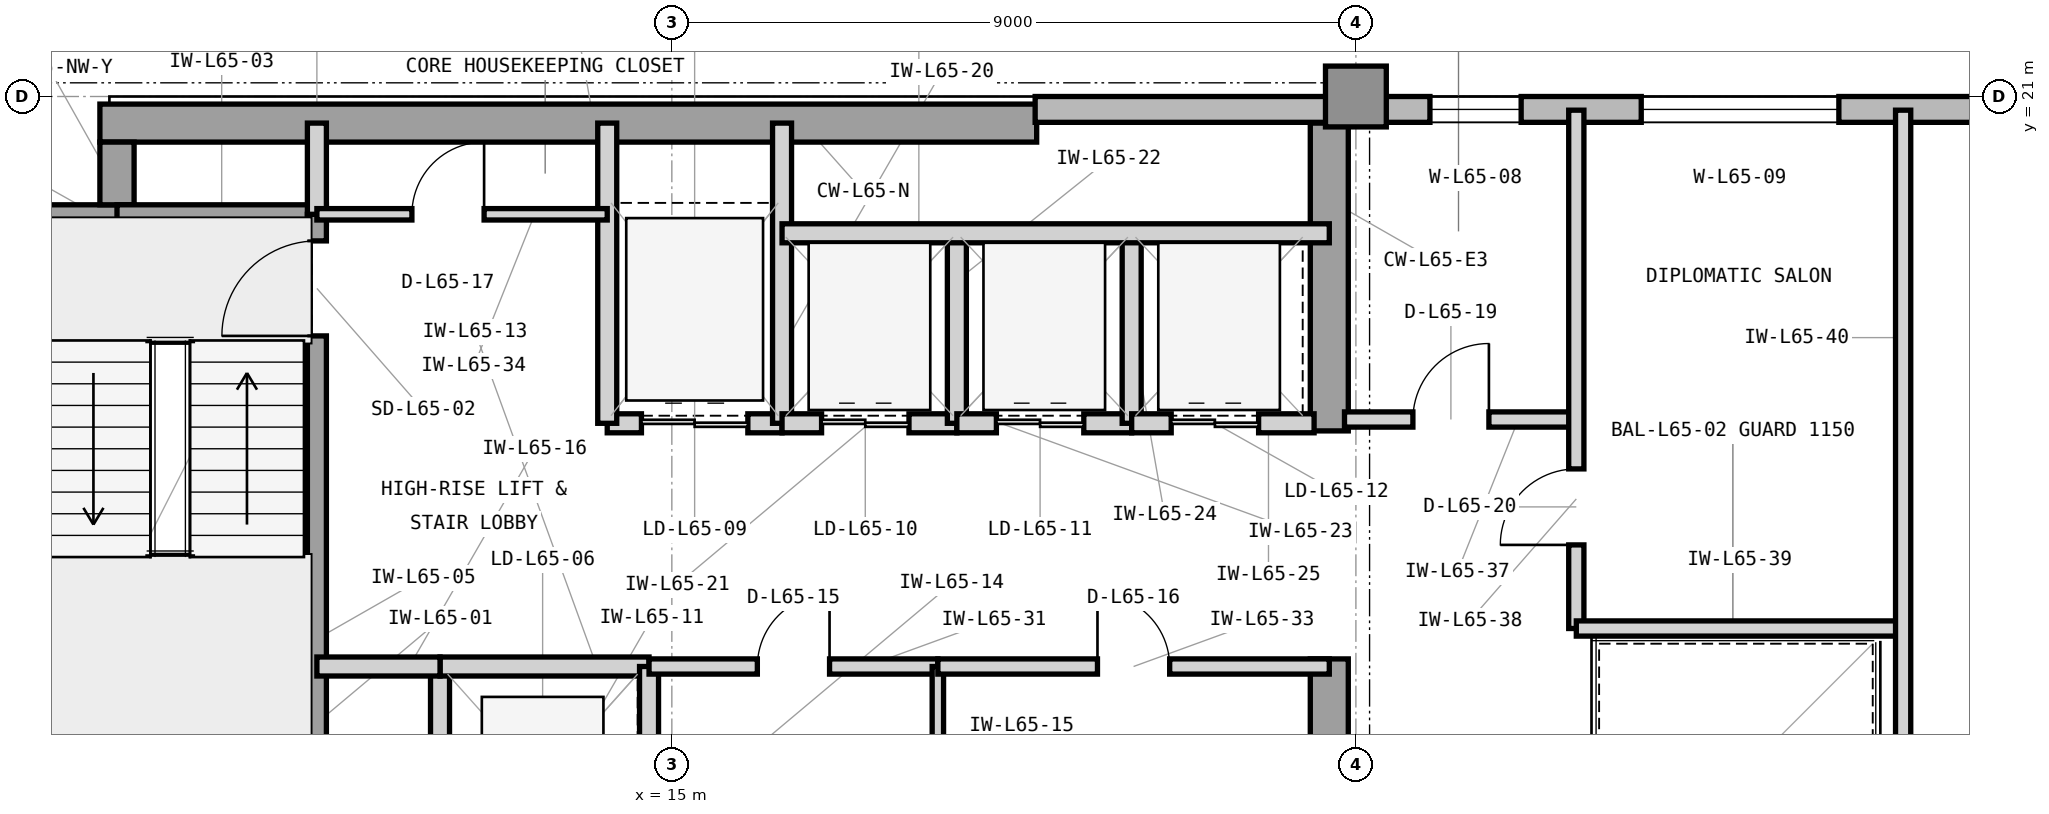
"""IFC4 building model, lengths in metres.
Left out: names, types, materials, properties, quantities, classifications, styles, units other than length and angle.
Written with IfcOpenShell. Run it as: python <this file> out.ifc"""

import sys

from ifc_helpers import new_model, si_unit, direction, frame, frame_2d, origin, origin_2d, place, context, subcontext, project, spatial, rectangle, extrude, element, fill, save


model = new_model("IFC4")
c1 = context("Model", 3, precision=1e-05, world=origin(), true_north=direction((0.0, 1.0)))
c2 = subcontext(c1, "Body", "Model", "MODEL_VIEW")
j1 = project(units=[si_unit("LENGTHUNIT", "METRE"), si_unit("PLANEANGLEUNIT", "RADIAN")], contexts=[c1])
p1 = place(None, origin())
s1 = spatial("IfcSite", under=j1, at=p1, CompositionType="ELEMENT")
p2 = place(p1, origin())
s2 = spatial("IfcBuilding", under=s1, at=p2, CompositionType="ELEMENT")
p3 = place(p2, frame((0.0, 0.0, 266.4)))
s3 = spatial("IfcBuildingStorey", under=s2, at=p3, CompositionType="ELEMENT", Elevation=266.4)
p4 = place(p3, frame((7.475, 20.65, 0.0), z_axis=(0.0, 0.0, 1.0), x_axis=(1.0, 0.0, 0.0)))
e1 = element("IfcWall", 1, at=p4, inside=s3, PredefinedType="SHEAR", context=c2, shape_type="SweptSolid", body=[
    extrude(rectangle(XDim=12.325, YDim=0.5, at=frame_2d((6.163, 0.0))), origin(), (0.0, 0.0, 1.0), 3.9),
])
p5 = place(p3, frame((23.65, 10.4, 0.0), z_axis=(0.0, 0.0, 1.0), x_axis=(0.0, 1.0, 0.0)))
e2 = element("IfcWall", 2, at=p5, inside=s3, PredefinedType="SHEAR", context=c2, shape_type="SweptSolid", body=[
    extrude(rectangle(XDim=3.2, YDim=0.5, at=frame_2d((1.6, 0.0))), origin(), (0.0, 0.0, 1.0), 3.9),
])
p6 = place(p3, frame((23.65, 16.6, 0.0), z_axis=(0.0, 0.0, 1.0), x_axis=(0.0, 1.0, 0.0)))
e3 = element("IfcWall", 3, at=p6, inside=s3, PredefinedType="SHEAR", context=c2, shape_type="SweptSolid", body=[
    extrude(rectangle(XDim=4.05, YDim=0.5, at=frame_2d((2.025, 0.0))), origin(), (0.0, 0.0, 1.0), 3.9),
])
p7 = place(p3, frame((6.6, 19.35, 0.0), z_axis=(0.0, 0.0, 1.0), x_axis=(1.0, 0.0, 0.0)))
e4 = element("IfcWall", 4, at=p7, inside=s3, PredefinedType="SHEAR", context=c2, shape_type="SweptSolid", body=[
    extrude(rectangle(XDim=1.325, YDim=0.45, at=frame_2d((0.663, 0.0))), origin(), (0.0, 0.0, 1.0), 3.9),
])
p8 = place(p3, frame((7.7, 19.575, 0.0), z_axis=(0.0, 0.0, 1.0), x_axis=(0.0, 1.0, 0.0)))
e5 = element("IfcWall", 5, at=p8, inside=s3, PredefinedType="SHEAR", context=c2, shape_type="SweptSolid", body=[
    extrude(rectangle(XDim=0.825, YDim=0.45, at=frame_2d((0.413, 0.0))), origin(), (0.0, 0.0, 1.0), 3.9),
])
p9 = place(p3, frame((24.0, 21.0, 0.0), z_axis=(0.0, 0.0, 1.0), x_axis=(1.0, 0.0, 0.0)))
e6 = element("IfcColumn", 6, at=p9, inside=s3, PredefinedType="COLUMN", context=c2, shape_type="SweptSolid", body=[
    extrude(rectangle(XDim=0.8, YDim=0.8, at=origin_2d()), origin(), (0.0, 0.0, 1.0), 3.9),
])
p10 = place(p3, frame((52.4, 20.83, 0.0), z_axis=(0.0, 0.0, 1.0), x_axis=(-1.0, 0.0, 0.0)))
e7 = element("IfcWall", 7, at=p10, inside=s3, PredefinedType="STANDARD", context=c2, shape_type="SweptSolid", body=[
    extrude(rectangle(XDim=32.62, YDim=0.34, at=frame_2d((16.31, 0.0))), origin(), (0.0, 0.0, 1.0), 3.715),
])
p11 = place(p10, frame((5.69, 0.0, 0.8)))
e8 = element("IfcOpeningElement", 8, at=p11, cuts=e7, PredefinedType="OPENING", context=c2, shape_type="SweptSolid", body=[
    extrude(rectangle(XDim=2.6, YDim=2.35, at=frame_2d((1.3, 1.175))), frame((0.0, 0.18, 0.0), z_axis=(0.0, -1.0, 0.0), x_axis=(1.0, 0.0, 0.0)), (0.0, 0.0, 1.0), 0.36),
])
p12 = place(p10, frame((15.01, 0.0, 0.8)))
e9 = element("IfcOpeningElement", 9, at=p12, cuts=e7, PredefinedType="OPENING", context=c2, shape_type="SweptSolid", body=[
    extrude(rectangle(XDim=2.6, YDim=2.35, at=frame_2d((1.3, 1.175))), frame((0.0, 0.18, 0.0), z_axis=(0.0, -1.0, 0.0), x_axis=(1.0, 0.0, 0.0)), (0.0, 0.0, 1.0), 0.36),
])
p13 = place(p10, frame((26.226, 0.0, 0.8)))
e10 = element("IfcOpeningElement", 10, at=p13, cuts=e7, PredefinedType="OPENING", context=c2, shape_type="SweptSolid", body=[
    extrude(rectangle(XDim=1.2, YDim=2.35, at=frame_2d((0.6, 1.175))), frame((0.0, 0.18, 0.0), z_axis=(0.0, -1.0, 0.0), x_axis=(1.0, 0.0, 0.0)), (0.0, 0.0, 1.0), 0.36),
])
p14 = place(p10, frame((22.046, 0.0, 0.8)))
e11 = element("IfcOpeningElement", 11, at=p14, cuts=e7, PredefinedType="OPENING", context=c2, shape_type="SweptSolid", body=[
    extrude(rectangle(XDim=2.6, YDim=2.35, at=frame_2d((1.3, 1.175))), frame((0.0, 0.18, 0.0), z_axis=(0.0, -1.0, 0.0), x_axis=(1.0, 0.0, 0.0)), (0.0, 0.0, 1.0), 0.36),
])
p15 = place(p3, frame((7.7, 19.45, 0.0), z_axis=(0.0, 0.0, 1.0), x_axis=(1.0, 0.0, 0.0)))
e12 = element("IfcWall", 12, at=p15, inside=s3, PredefinedType="SHEAR", context=c2, shape_type="SweptSolid", body=[
    extrude(rectangle(XDim=2.755, YDim=0.25, at=frame_2d((1.377, 0.0))), origin(), (0.0, 0.0, 1.0), 3.9),
])
p16 = place(p3, frame((10.33, 12.0, 0.0), z_axis=(0.0, 0.0, 1.0), x_axis=(0.0, 1.0, 0.0)))
e13 = element("IfcWall", 13, at=p16, inside=s3, PredefinedType="SHEAR", context=c2, shape_type="SweptSolid", body=[
    extrude(rectangle(XDim=7.45, YDim=0.25, at=frame_2d((3.725, 0.0))), origin(), (0.0, 0.0, 1.0), 3.9),
])
p17 = place(p16, frame((5.85, 0.0, 0.0)))
e14 = element("IfcOpeningElement", 14, at=p17, cuts=e13, PredefinedType="OPENING", context=c2, shape_type="SweptSolid", body=[
    extrude(rectangle(XDim=1.25, YDim=2.2, at=frame_2d((0.625, 1.1))), frame((0.0, 0.135, 0.0), z_axis=(0.0, -1.0, 0.0), x_axis=(1.0, 0.0, 0.0)), (0.0, 0.0, 1.0), 0.27),
])
p18 = place(p3, frame((10.33, 19.45, 0.0), z_axis=(0.0, 0.0, 1.0), x_axis=(0.0, 1.0, 0.0)))
e15 = element("IfcWall", 15, at=p18, inside=s3, PredefinedType="PARTITIONING", context=c2, shape_type="SweptSolid", body=[
    extrude(rectangle(XDim=1.2, YDim=0.25, at=frame_2d((0.6, 0.0))), origin(), (0.0, 0.0, 1.0), 3.705),
])
p19 = place(p3, frame((11.95, 10.5, 0.0), z_axis=(0.0, 0.0, 1.0), x_axis=(0.0, 1.0, 0.0)))
e16 = element("IfcWall", 16, at=p19, inside=s3, PredefinedType="PARTITIONING", context=c2, shape_type="SweptSolid", body=[
    extrude(rectangle(XDim=3.0, YDim=0.25, at=frame_2d((1.5, 0.0))), origin(), (0.0, 0.0, 1.0), 3.705),
])
p20 = place(p3, frame((11.95, 13.5, 0.0), z_axis=(0.0, 0.0, 1.0), x_axis=(1.0, 0.0, 0.0)))
e17 = element("IfcWall", 17, at=p20, inside=s3, PredefinedType="PARTITIONING", context=c2, shape_type="SweptSolid", body=[
    extrude(rectangle(XDim=2.75, YDim=0.25, at=frame_2d((1.375, 0.0))), origin(), (0.0, 0.0, 1.0), 3.088),
])
p21 = place(p3, frame((14.7, 10.5, 0.0), z_axis=(0.0, 0.0, 1.0), x_axis=(0.0, 1.0, 0.0)))
e18 = element("IfcWall", 18, at=p21, inside=s3, PredefinedType="PARTITIONING", context=c2, shape_type="SweptSolid", body=[
    extrude(rectangle(XDim=3.0, YDim=0.25, at=frame_2d((1.5, 0.0))), origin(), (0.0, 0.0, 1.0), 3.705),
])
p22 = place(p3, frame((10.33, 13.5, 0.0), z_axis=(0.0, 0.0, 1.0), x_axis=(1.0, 0.0, 0.0)))
e19 = element("IfcWall", 19, at=p22, inside=s3, PredefinedType="PARTITIONING", context=c2, shape_type="SweptSolid", body=[
    extrude(rectangle(XDim=1.62, YDim=0.25, at=frame_2d((0.81, 0.0))), origin(), (0.0, 0.0, 1.0), 3.088),
])
p23 = place(p3, frame((14.15, 16.7, 0.0), z_axis=(0.0, 0.0, 1.0), x_axis=(1.0, 0.0, 0.0)))
e20 = element("IfcWall", 20, at=p23, inside=s3, PredefinedType="PARTITIONING", context=c2, shape_type="SweptSolid", body=[
    extrude(rectangle(XDim=2.3, YDim=0.25, at=frame_2d((1.15, 0.0))), origin(), (0.0, 0.0, 1.0), 3.088),
])
p24 = place(p23, frame((0.45, 0.0, 0.0)))
e21 = element("IfcOpeningElement", 21, at=p24, cuts=e20, PredefinedType="OPENING", context=c2, shape_type="SweptSolid", body=[
    extrude(rectangle(XDim=1.4, YDim=2.35, at=frame_2d((0.7, 1.175))), frame((0.0, 0.135, 0.0), z_axis=(0.0, -1.0, 0.0), x_axis=(1.0, 0.0, 0.0)), (0.0, 0.0, 1.0), 0.27),
])
for number, where, z_axis, x_axis in (
    (22, (14.15, 16.7, 0.0), (0.0, 0.0, 1.0), (0.0, 1.0, 0.0)),
    (23, (16.45, 16.7, 0.0), (0.0, 0.0, 1.0), (0.0, 1.0, 0.0)),
):
    element("IfcWall", number, at=place(p3, frame(where, z_axis=z_axis, x_axis=x_axis)), inside=s3, PredefinedType="PARTITIONING", context=c2, shape_type="SweptSolid", body=[
        extrude(rectangle(XDim=3.95, YDim=0.25, at=frame_2d((1.975, 0.0))), origin(), (0.0, 0.0, 1.0), 3.705),
    ])
p25 = place(p3, frame((16.45, 16.7, 0.0), z_axis=(0.0, 0.0, 1.0), x_axis=(1.0, 0.0, 0.0)))
e24 = element("IfcWall", 24, at=p25, inside=s3, PredefinedType="PARTITIONING", context=c2, shape_type="SweptSolid", body=[
    extrude(rectangle(XDim=2.3, YDim=0.25, at=frame_2d((1.15, 0.0))), origin(), (0.0, 0.0, 1.0), 3.088),
])
p26 = place(p25, frame((0.52, 0.0, 0.0)))
e25 = element("IfcOpeningElement", 25, at=p26, cuts=e24, PredefinedType="OPENING", context=c2, shape_type="SweptSolid", body=[
    extrude(rectangle(XDim=1.15, YDim=2.25, at=frame_2d((0.575, 1.125))), frame((0.0, 0.135, 0.0), z_axis=(0.0, -1.0, 0.0), x_axis=(1.0, 0.0, 0.0)), (0.0, 0.0, 1.0), 0.27),
])
p27 = place(p3, frame((18.75, 16.7, 0.0), z_axis=(0.0, 0.0, 1.0), x_axis=(0.0, 1.0, 0.0)))
e26 = element("IfcWall", 26, at=p27, inside=s3, PredefinedType="PARTITIONING", context=c2, shape_type="SweptSolid", body=[
    extrude(rectangle(XDim=2.5, YDim=0.25, at=frame_2d((1.25, 0.0))), origin(), (0.0, 0.0, 1.0), 3.705),
])
p28 = place(p3, frame((18.75, 16.7, 0.0), z_axis=(0.0, 0.0, 1.0), x_axis=(1.0, 0.0, 0.0)))
e27 = element("IfcWall", 27, at=p28, inside=s3, PredefinedType="PARTITIONING", context=c2, shape_type="SweptSolid", body=[
    extrude(rectangle(XDim=2.3, YDim=0.25, at=frame_2d((1.15, 0.0))), origin(), (0.0, 0.0, 1.0), 3.088),
])
p29 = place(p28, frame((0.52, 0.0, 0.0)))
e28 = element("IfcOpeningElement", 28, at=p29, cuts=e27, PredefinedType="OPENING", context=c2, shape_type="SweptSolid", body=[
    extrude(rectangle(XDim=1.15, YDim=2.25, at=frame_2d((0.575, 1.125))), frame((0.0, 0.135, 0.0), z_axis=(0.0, -1.0, 0.0), x_axis=(1.0, 0.0, 0.0)), (0.0, 0.0, 1.0), 0.27),
])
p30 = place(p3, frame((21.05, 16.7, 0.0), z_axis=(0.0, 0.0, 1.0), x_axis=(0.0, 1.0, 0.0)))
e29 = element("IfcWall", 29, at=p30, inside=s3, PredefinedType="PARTITIONING", context=c2, shape_type="SweptSolid", body=[
    extrude(rectangle(XDim=2.5, YDim=0.25, at=frame_2d((1.25, 0.0))), origin(), (0.0, 0.0, 1.0), 3.705),
])
p31 = place(p3, frame((21.05, 16.7, 0.0), z_axis=(0.0, 0.0, 1.0), x_axis=(1.0, 0.0, 0.0)))
e30 = element("IfcWall", 30, at=p31, inside=s3, PredefinedType="PARTITIONING", context=c2, shape_type="SweptSolid", body=[
    extrude(rectangle(XDim=2.4, YDim=0.25, at=frame_2d((1.2, 0.0))), origin(), (0.0, 0.0, 1.0), 3.088),
])
p32 = place(p31, frame((0.52, 0.0, 0.0)))
e31 = element("IfcOpeningElement", 31, at=p32, cuts=e30, PredefinedType="OPENING", context=c2, shape_type="SweptSolid", body=[
    extrude(rectangle(XDim=1.15, YDim=2.25, at=frame_2d((0.575, 1.125))), frame((0.0, 0.135, 0.0), z_axis=(0.0, -1.0, 0.0), x_axis=(1.0, 0.0, 0.0)), (0.0, 0.0, 1.0), 0.27),
])
p33 = place(p3, frame((16.45, 19.2, 0.0), z_axis=(0.0, 0.0, 1.0), x_axis=(1.0, 0.0, 0.0)))
e32 = element("IfcWall", 32, at=p33, inside=s3, PredefinedType="PARTITIONING", context=c2, shape_type="SweptSolid", body=[
    extrude(rectangle(XDim=7.2, YDim=0.25, at=frame_2d((3.6, 0.0))), origin(), (0.0, 0.0, 1.0), 3.705),
])
p34 = place(p3, frame((14.7, 13.5, 0.0), z_axis=(0.0, 0.0, 1.0), x_axis=(1.0, 0.0, 0.0)))
e33 = element("IfcWall", 33, at=p34, inside=s3, PredefinedType="PARTITIONING", context=c2, shape_type="SweptSolid", body=[
    extrude(rectangle(XDim=3.8, YDim=0.2, at=frame_2d((1.9, 0.0))), origin(), (0.0, 0.0, 1.0), 3.088),
])
p35 = place(p34, frame((1.425, 0.0, 0.0)))
e34 = element("IfcOpeningElement", 34, at=p35, cuts=e33, PredefinedType="OPENING", context=c2, shape_type="SweptSolid", body=[
    extrude(rectangle(XDim=0.95, YDim=2.1, at=frame_2d((0.475, 1.05))), frame((0.0, 0.11, 0.0), z_axis=(0.0, -1.0, 0.0), x_axis=(1.0, 0.0, 0.0)), (0.0, 0.0, 1.0), 0.22),
])
p36 = place(p3, frame((18.5, 10.34, 0.0), z_axis=(0.0, 0.0, 1.0), x_axis=(0.0, 1.0, 0.0)))
e35 = element("IfcWall", 35, at=p36, inside=s3, PredefinedType="PARTITIONING", context=c2, shape_type="SweptSolid", body=[
    extrude(rectangle(XDim=3.16, YDim=0.15, at=frame_2d((1.58, 0.0))), origin(), (0.0, 0.0, 1.0), 3.705),
])
p37 = place(p3, frame((18.5, 13.5, 0.0), z_axis=(0.0, 0.0, 1.0), x_axis=(1.0, 0.0, 0.0)))
e36 = element("IfcWall", 36, at=p37, inside=s3, PredefinedType="PARTITIONING", context=c2, shape_type="SweptSolid", body=[
    extrude(rectangle(XDim=5.15, YDim=0.2, at=frame_2d((2.575, 0.0))), origin(), (0.0, 0.0, 1.0), 3.088),
])
p38 = place(p37, frame((2.1, 0.0, 0.0)))
e37 = element("IfcOpeningElement", 37, at=p38, cuts=e36, PredefinedType="OPENING", context=c2, shape_type="SweptSolid", body=[
    extrude(rectangle(XDim=0.95, YDim=2.1, at=frame_2d((0.475, 1.05))), frame((0.0, 0.11, 0.0), z_axis=(0.0, -1.0, 0.0), x_axis=(1.0, 0.0, 0.0)), (0.0, 0.0, 1.0), 0.22),
])
p39 = place(p3, frame((10.33, 19.45, 0.0), z_axis=(0.0, 0.0, 1.0), x_axis=(1.0, 0.0, 0.0)))
e38 = element("IfcWall", 38, at=p39, inside=s3, PredefinedType="PARTITIONING", context=c2, shape_type="SweptSolid", body=[
    extrude(rectangle(XDim=3.82, YDim=0.15, at=frame_2d((1.91, 0.0))), origin(), (0.0, 0.0, 1.0), 3.705),
])
p40 = place(p39, frame((1.25, 0.0, 0.0)))
e39 = element("IfcOpeningElement", 39, at=p40, cuts=e38, PredefinedType="OPENING", context=c2, shape_type="SweptSolid", body=[
    extrude(rectangle(XDim=0.95, YDim=2.1, at=frame_2d((0.475, 1.05))), frame((0.0, 0.085, 0.0), z_axis=(0.0, -1.0, 0.0), x_axis=(1.0, 0.0, 0.0)), (0.0, 0.0, 1.0), 0.17),
])
p41 = place(p3, frame((23.85, 16.75, 0.0), z_axis=(0.0, 0.0, 1.0), x_axis=(1.0, 0.0, 0.0)))
e40 = element("IfcWall", 40, at=p41, inside=s3, PredefinedType="PARTITIONING", context=c2, shape_type="SweptSolid", body=[
    extrude(rectangle(XDim=3.05, YDim=0.2, at=frame_2d((1.525, 0.0))), origin(), (0.0, 0.0, 1.0), 3.705),
])
p42 = place(p41, frame((0.9, 0.0, 0.0)))
e41 = element("IfcOpeningElement", 41, at=p42, cuts=e40, PredefinedType="OPENING", context=c2, shape_type="SweptSolid", body=[
    extrude(rectangle(XDim=1.0, YDim=2.15, at=frame_2d((0.5, 1.075))), frame((0.0, 0.11, 0.0), z_axis=(0.0, -1.0, 0.0), x_axis=(1.0, 0.0, 0.0)), (0.0, 0.0, 1.0), 0.22),
])
p43 = place(p3, frame((26.9, 14.0, 0.0), z_axis=(0.0, 0.0, 1.0), x_axis=(0.0, 1.0, 0.0)))
e42 = element("IfcWall", 42, at=p43, inside=s3, PredefinedType="PARTITIONING", context=c2, shape_type="SweptSolid", body=[
    extrude(rectangle(XDim=6.82, YDim=0.2, at=frame_2d((3.41, 0.0))), origin(), (0.0, 0.0, 1.0), 3.705),
])
p44 = place(p43, frame((1.1, 0.0, 0.0)))
e43 = element("IfcOpeningElement", 43, at=p44, cuts=e42, PredefinedType="OPENING", context=c2, shape_type="SweptSolid", body=[
    extrude(rectangle(XDim=1.0, YDim=2.15, at=frame_2d((0.5, 1.075))), frame((0.0, 0.11, 0.0), z_axis=(0.0, -1.0, 0.0), x_axis=(1.0, 0.0, 0.0)), (0.0, 0.0, 1.0), 0.22),
])
p45 = place(p3, frame((26.9, 14.0, 0.0), z_axis=(0.0, 0.0, 1.0), x_axis=(1.0, 0.0, 0.0)))
e44 = element("IfcWall", 44, at=p45, inside=s3, PredefinedType="PARTITIONING", context=c2, shape_type="SweptSolid", body=[
    extrude(rectangle(XDim=4.3, YDim=0.2, at=frame_2d((2.15, 0.0))), origin(), (0.0, 0.0, 1.0), 3.705),
])
p46 = place(p3, frame((31.2, 8.85, 0.0), z_axis=(0.0, 0.0, 1.0), x_axis=(0.0, 1.0, 0.0)))
e45 = element("IfcWall", 45, at=p46, inside=s3, PredefinedType="PARTITIONING", context=c2, shape_type="SweptSolid", body=[
    extrude(rectangle(XDim=11.97, YDim=0.2, at=frame_2d((5.985, 0.0))), origin(), (0.0, 0.0, 1.0), 3.705),
])
p47 = place(p17, origin())
e46 = element("IfcDoor", 46, at=p47, inside=s3, OperationType="SINGLE_SWING_LEFT", PredefinedType="DOOR", context=c2, shape_type="SweptSolid", body=[
    extrude(rectangle(XDim=1.25, YDim=2.2, at=frame_2d((0.625, 1.1))), frame((0.0, 0.025, 0.0), z_axis=(0.0, -1.0, 0.0), x_axis=(1.0, 0.0, 0.0)), (0.0, 0.0, 1.0), 0.05),
])
fill(e14, e46)
p48 = place(p24, origin())
e47 = element("IfcDoor", 47, at=p48, inside=s3, OperationType="DOUBLE_DOOR_SLIDING", PredefinedType="DOOR", context=c2, shape_type="SweptSolid", body=[
    extrude(rectangle(XDim=1.4, YDim=2.35, at=frame_2d((0.7, 1.175))), frame((0.0, 0.025, 0.0), z_axis=(0.0, -1.0, 0.0), x_axis=(1.0, 0.0, 0.0)), (0.0, 0.0, 1.0), 0.05),
])
fill(e21, e47)
p49 = place(p26, origin())
e48 = element("IfcDoor", 48, at=p49, inside=s3, OperationType="DOUBLE_DOOR_SLIDING", PredefinedType="DOOR", context=c2, shape_type="SweptSolid", body=[
    extrude(rectangle(XDim=1.15, YDim=2.25, at=frame_2d((0.575, 1.125))), frame((0.0, 0.025, 0.0), z_axis=(0.0, -1.0, 0.0), x_axis=(1.0, 0.0, 0.0)), (0.0, 0.0, 1.0), 0.05),
])
fill(e25, e48)
p50 = place(p29, origin())
e49 = element("IfcDoor", 49, at=p50, inside=s3, OperationType="DOUBLE_DOOR_SLIDING", PredefinedType="DOOR", context=c2, shape_type="SweptSolid", body=[
    extrude(rectangle(XDim=1.15, YDim=2.25, at=frame_2d((0.575, 1.125))), frame((0.0, 0.025, 0.0), z_axis=(0.0, -1.0, 0.0), x_axis=(1.0, 0.0, 0.0)), (0.0, 0.0, 1.0), 0.05),
])
fill(e28, e49)
p51 = place(p32, origin())
e50 = element("IfcDoor", 50, at=p51, inside=s3, OperationType="DOUBLE_DOOR_SLIDING", PredefinedType="DOOR", context=c2, shape_type="SweptSolid", body=[
    extrude(rectangle(XDim=1.15, YDim=2.25, at=frame_2d((0.575, 1.125))), frame((0.0, 0.025, 0.0), z_axis=(0.0, -1.0, 0.0), x_axis=(1.0, 0.0, 0.0)), (0.0, 0.0, 1.0), 0.05),
])
fill(e31, e50)
p52 = place(p35, origin())
e51 = element("IfcDoor", 51, at=p52, inside=s3, OperationType="SINGLE_SWING_RIGHT", PredefinedType="DOOR", context=c2, shape_type="SweptSolid", body=[
    extrude(rectangle(XDim=0.95, YDim=2.1, at=frame_2d((0.475, 1.05))), frame((0.0, 0.025, 0.0), z_axis=(0.0, -1.0, 0.0), x_axis=(1.0, 0.0, 0.0)), (0.0, 0.0, 1.0), 0.05),
])
fill(e34, e51)
p53 = place(p38, origin())
e52 = element("IfcDoor", 52, at=p53, inside=s3, OperationType="SINGLE_SWING_LEFT", PredefinedType="DOOR", context=c2, shape_type="SweptSolid", body=[
    extrude(rectangle(XDim=0.95, YDim=2.1, at=frame_2d((0.475, 1.05))), frame((0.0, 0.025, 0.0), z_axis=(0.0, -1.0, 0.0), x_axis=(1.0, 0.0, 0.0)), (0.0, 0.0, 1.0), 0.05),
])
fill(e37, e52)
p54 = place(p40, origin())
e53 = element("IfcDoor", 53, at=p54, inside=s3, OperationType="SINGLE_SWING_RIGHT", PredefinedType="DOOR", context=c2, shape_type="SweptSolid", body=[
    extrude(rectangle(XDim=0.95, YDim=2.1, at=frame_2d((0.475, 1.05))), frame((0.0, 0.025, 0.0), z_axis=(0.0, -1.0, 0.0), x_axis=(1.0, 0.0, 0.0)), (0.0, 0.0, 1.0), 0.05),
])
fill(e39, e53)
p55 = place(p42, origin())
e54 = element("IfcDoor", 54, at=p55, inside=s3, OperationType="SINGLE_SWING_RIGHT", PredefinedType="DOOR", context=c2, shape_type="SweptSolid", body=[
    extrude(rectangle(XDim=1.0, YDim=2.15, at=frame_2d((0.5, 1.075))), frame((0.0, 0.025, 0.0), z_axis=(0.0, -1.0, 0.0), x_axis=(1.0, 0.0, 0.0)), (0.0, 0.0, 1.0), 0.05),
])
fill(e41, e54)
p56 = place(p44, origin())
e55 = element("IfcDoor", 55, at=p56, inside=s3, OperationType="SINGLE_SWING_LEFT", PredefinedType="DOOR", context=c2, shape_type="SweptSolid", body=[
    extrude(rectangle(XDim=1.0, YDim=2.15, at=frame_2d((0.5, 1.075))), frame((0.0, 0.025, 0.0), z_axis=(0.0, -1.0, 0.0), x_axis=(1.0, 0.0, 0.0)), (0.0, 0.0, 1.0), 0.05),
])
fill(e43, e55)
p57 = place(p13, origin())
e56 = element("IfcWindow", 56, at=p57, inside=s3, PartitioningType="SINGLE_PANEL", PredefinedType="WINDOW", context=c2, shape_type="SweptSolid", body=[
    extrude(rectangle(XDim=1.2, YDim=2.35, at=frame_2d((0.6, 1.175))), frame((0.0, 0.11, 0.0), z_axis=(0.0, -1.0, 0.0), x_axis=(1.0, 0.0, 0.0)), (0.0, 0.0, 1.0), 0.06),
])
fill(e10, e56)
p58 = place(p14, origin())
e57 = element("IfcWindow", 57, at=p58, inside=s3, PartitioningType="SINGLE_PANEL", PredefinedType="WINDOW", context=c2, shape_type="SweptSolid", body=[
    extrude(rectangle(XDim=2.6, YDim=2.35, at=frame_2d((1.3, 1.175))), frame((0.0, 0.11, 0.0), z_axis=(0.0, -1.0, 0.0), x_axis=(1.0, 0.0, 0.0)), (0.0, 0.0, 1.0), 0.06),
])
fill(e11, e57)
save(model, sys.argv[1])
